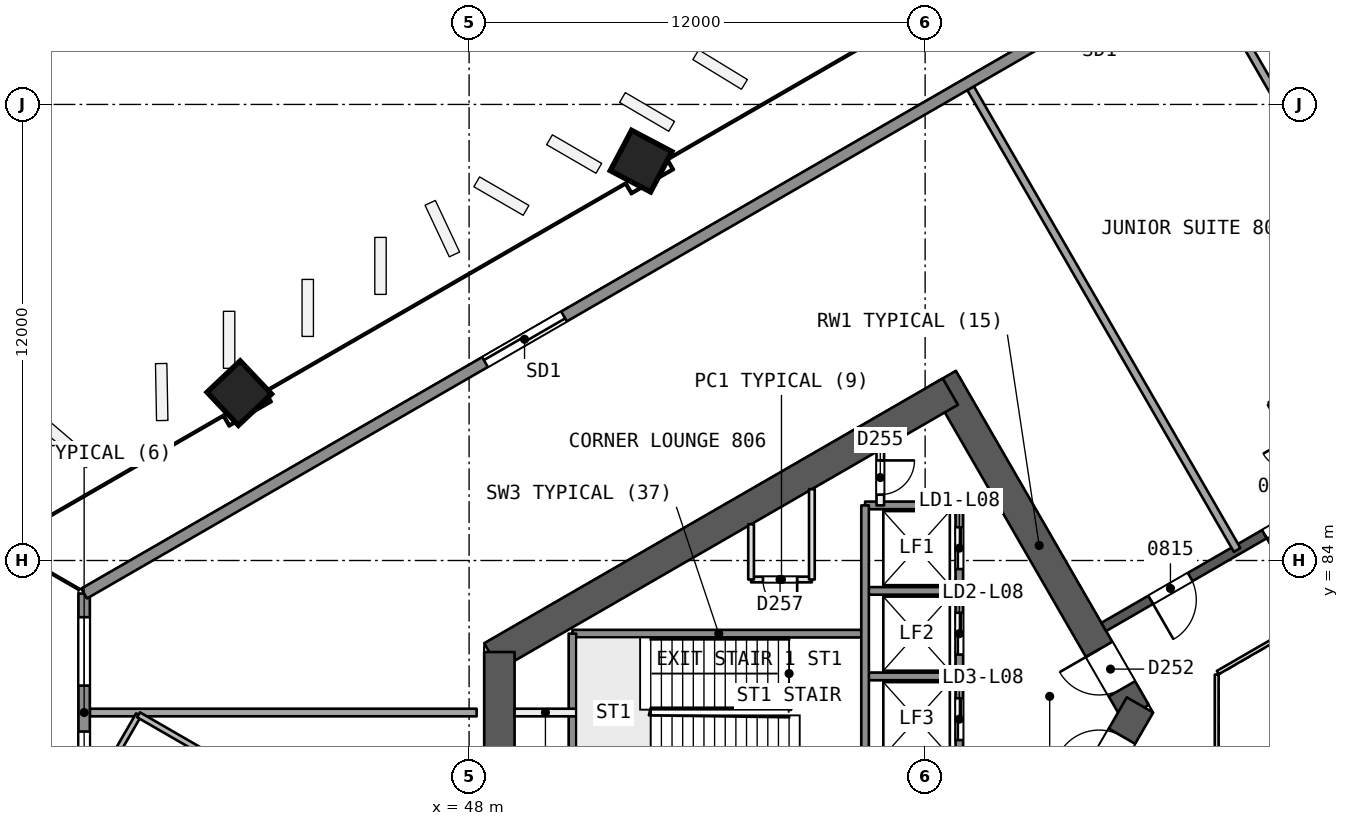
"""IFC4 building model, lengths in metres.
Left out: names, types, materials, properties, quantities, classifications, styles, units other than length and angle.
Written with IfcOpenShell. Run it as: python <this file> out.ifc"""

import sys

from ifc_helpers import new_model, si_unit, direction, frame, frame_2d, origin, origin_2d, place, context, subcontext, project, spatial, rectangle, extrude, element, fill, save


model = new_model("IFC4")
c1 = context("Model", 3, precision=1e-05, world=origin(), true_north=direction((0.0, 1.0)))
c2 = subcontext(c1, "Body", "Model", "MODEL_VIEW")
j1 = project(units=[si_unit("LENGTHUNIT", "METRE"), si_unit("PLANEANGLEUNIT", "RADIAN")], contexts=[c1])
p1 = place(None, origin())
s1 = spatial("IfcSite", under=j1, at=p1, CompositionType="ELEMENT")
p2 = place(p1, origin())
s2 = spatial("IfcBuilding", under=s1, at=p2, CompositionType="ELEMENT")
p3 = place(p2, frame((0.0, 0.0, 41.1)))
s3 = spatial("IfcBuildingStorey", under=s2, at=p3, CompositionType="ELEMENT", Elevation=41.1)
p4 = place(p3, frame((65.538, 80.0, 0.0), z_axis=(0.0, 0.0, 1.0), x_axis=(-0.49999662545, 0.866027352073, 0.0)))
e1 = element("IfcWall", 1, at=p4, inside=s3, PredefinedType="SHEAR", context=c2, shape_type="SweptSolid", body=[
    extrude(rectangle(XDim=10.149, YDim=0.8, at=frame_2d((5.074, 0.0))), origin(), (0.0, 0.0, 1.0), 3.7),
])
p5 = place(p4, frame((0.719, 0.0, 0.0)))
e2 = element("IfcOpeningElement", 2, at=p5, cuts=e1, PredefinedType="OPENING", context=c2, shape_type="SweptSolid", body=[
    extrude(rectangle(XDim=1.2, YDim=2.1, at=frame_2d((0.6, 1.05))), frame((0.0, 0.411, 0.0), z_axis=(0.0, -1.0, 0.0), x_axis=(1.0, 0.0, 0.0)), (0.0, 0.0, 1.0), 0.821),
])
p6 = place(p3, frame((60.664, 88.443, 0.0), z_axis=(0.0, 0.0, 1.0), x_axis=(-0.866029478545, -0.499992942241, 0.0)))
e3 = element("IfcWall", 3, at=p6, inside=s3, PredefinedType="SHEAR", context=c2, shape_type="SweptSolid", body=[
    extrude(rectangle(XDim=13.933, YDim=0.8, at=frame_2d((6.967, 0.0))), origin(), (0.0, 0.0, 1.0), 3.7),
])
p7 = place(p3, frame((48.797, 81.592, 0.0), z_axis=(0.0, 0.0, 1.0), x_axis=(0.0, -1.0, 0.0)))
e4 = element("IfcWall", 4, at=p7, inside=s3, PredefinedType="SHEAR", context=c2, shape_type="SweptSolid", body=[
    extrude(rectangle(XDim=3.415, YDim=0.8, at=frame_2d((1.707, 0.0))), origin(), (0.0, 0.0, 1.0), 3.7),
])
p8 = place(p3, frame((60.664, 71.557, 0.0), z_axis=(0.0, 0.0, 1.0), x_axis=(0.50000409368, 0.866023040284, 0.0)))
e5 = element("IfcWall", 5, at=p8, inside=s3, PredefinedType="SHEAR", context=c2, shape_type="SweptSolid", body=[
    extrude(rectangle(XDim=9.98, YDim=0.8, at=frame_2d((4.99, 0.0))), origin(), (0.0, 0.0, 1.0), 3.7),
])
p9 = place(p8, frame((7.83, 0.0, 0.0)))
e6 = element("IfcOpeningElement", 6, at=p9, cuts=e5, PredefinedType="OPENING", context=c2, shape_type="SweptSolid", body=[
    extrude(rectangle(XDim=1.2, YDim=2.1, at=frame_2d((0.6, 1.05))), frame((0.0, 0.411, 0.0), z_axis=(0.0, -1.0, 0.0), x_axis=(1.0, 0.0, 0.0)), (0.0, 0.0, 1.0), 0.821),
])
p10 = place(p3, frame((78.2, 90.046, 0.0), z_axis=(0.0, 0.0, 1.0), x_axis=(-0.866026492143, -0.499998114903, 0.0)))
e7 = element("IfcWall", 7, at=p10, inside=s3, PredefinedType="SHEAR", context=c2, shape_type="SweptSolid", body=[
    extrude(rectangle(XDim=15.588, YDim=0.25, at=frame_2d((7.794, 0.0))), origin(), (0.0, 0.0, 1.0), 3.2),
])
p11 = place(p10, frame((1.838, 0.0, 0.0)))
e8 = element("IfcOpeningElement", 8, at=p11, cuts=e7, PredefinedType="OPENING", context=c2, shape_type="SweptSolid", body=[
    extrude(rectangle(XDim=1.0, YDim=2.1, at=frame_2d((0.5, 1.05))), frame((0.0, 0.135, 0.0), z_axis=(0.0, -1.0, 0.0), x_axis=(1.0, 0.0, 0.0)), (0.0, 0.0, 1.0), 0.271),
])
p12 = place(p10, frame((9.706, 0.0, 0.0)))
e9 = element("IfcOpeningElement", 9, at=p12, cuts=e7, PredefinedType="OPENING", context=c2, shape_type="SweptSolid", body=[
    extrude(rectangle(XDim=1.0, YDim=2.1, at=frame_2d((0.5, 1.05))), frame((0.0, 0.135, 0.0), z_axis=(0.0, -1.0, 0.0), x_axis=(1.0, 0.0, 0.0)), (0.0, 0.0, 1.0), 0.271),
])
p13 = place(p10, frame((12.962, 0.0, 0.0)))
e10 = element("IfcOpeningElement", 10, at=p13, cuts=e7, PredefinedType="OPENING", context=c2, shape_type="SweptSolid", body=[
    extrude(rectangle(XDim=1.2, YDim=2.4, at=frame_2d((0.6, 1.2))), frame((0.0, 0.135, 0.0), z_axis=(0.0, -1.0, 0.0), x_axis=(1.0, 0.0, 0.0)), (0.0, 0.0, 1.0), 0.271),
])
p14 = place(p3, frame((52.503, 94.523, 0.0), z_axis=(0.019328516974, -0.012138044789, 0.999739504221), x_axis=(-0.500200160538, 0.865674608258, 0.020180981521)))
e11 = element("IfcColumn", 11, at=p14, inside=s3, PredefinedType="COLUMN", context=c2, shape_type="SweptSolid", body=[
    extrude(rectangle(XDim=1.2, YDim=1.2, at=origin_2d()), origin(), (0.0, 0.0, 1.0), 3.701),
])
p15 = place(p3, frame((41.918, 88.412, 0.0), z_axis=(0.02855911485, -0.006793507689, 0.999569019734), x_axis=(-0.500405785832, 0.865555785013, 0.020180003373)))
e12 = element("IfcColumn", 12, at=p15, inside=s3, PredefinedType="COLUMN", context=c2, shape_type="SweptSolid", body=[
    extrude(rectangle(XDim=1.2, YDim=1.2, at=origin_2d()), origin(), (0.0, 0.0, 1.0), 3.702),
])
p16 = place(p3, frame((67.136, 99.855, 0.0), z_axis=(0.0, 0.0, 1.0), x_axis=(0.499997162821, -0.866027041824, 0.0)))
e13 = element("IfcWall", 13, at=p16, inside=s3, PredefinedType="PARTITIONING", context=c2, shape_type="SweptSolid", body=[
    extrude(rectangle(XDim=14.027, YDim=0.2, at=frame_2d((7.013, 0.0))), origin(), (0.0, 0.0, 1.0), 3.2),
])
p17 = place(p3, frame((70.513, 85.608, 0.0), z_axis=(0.0, 0.0, 1.0), x_axis=(-0.499987231761, 0.866032775405, 0.0)))
e14 = element("IfcWall", 14, at=p17, inside=s3, PredefinedType="PARTITIONING", context=c2, shape_type="SweptSolid", body=[
    extrude(rectangle(XDim=2.9, YDim=0.1, at=frame_2d((1.45, 0.0))), origin(), (0.0, 0.0, 1.0), 3.2),
])
p18 = place(p17, frame((1.05, 0.0, 0.0)))
e15 = element("IfcOpeningElement", 15, at=p18, cuts=e14, PredefinedType="OPENING", context=c2, shape_type="SweptSolid", body=[
    extrude(rectangle(XDim=0.8, YDim=2.1, at=frame_2d((0.4, 1.05))), frame((0.0, 0.061, 0.0), z_axis=(0.0, -1.0, 0.0), x_axis=(1.0, 0.0, 0.0)), (0.0, 0.0, 1.0), 0.121),
])
p19 = place(p3, frame((69.063, 88.119, 0.0), z_axis=(0.0, 0.0, 1.0), x_axis=(0.865989903783, 0.500061482766, 0.0)))
e16 = element("IfcWall", 16, at=p19, inside=s3, PredefinedType="PARTITIONING", context=c2, shape_type="SweptSolid", body=[
    extrude(rectangle(XDim=1.6, YDim=0.1, at=frame_2d((0.8, 0.0))), origin(), (0.0, 0.0, 1.0), 3.2),
])
p20 = place(p3, frame((61.197, 96.426, 0.0), z_axis=(0.0, 0.0, 1.0), x_axis=(0.499997162821, -0.866027041824, 0.0)))
e17 = element("IfcWall", 17, at=p20, inside=s3, PredefinedType="PARTITIONING", context=c2, shape_type="SweptSolid", body=[
    extrude(rectangle(XDim=14.027, YDim=0.2, at=frame_2d((7.013, 0.0))), origin(), (0.0, 0.0, 1.0), 3.2),
])
p21 = place(p3, frame((38.019, 80.0, 0.0), z_axis=(0.0, 0.0, 1.0), x_axis=(1.0, 0.0, 0.0)))
e18 = element("IfcWall", 18, at=p21, inside=s3, PredefinedType="PARTITIONING", context=c2, shape_type="SweptSolid", body=[
    extrude(rectangle(XDim=10.179, YDim=0.2, at=frame_2d((5.089, 0.0))), origin(), (0.0, 0.0, 1.0), 3.2),
])
p22 = place(p3, frame((38.019, 77.718, 0.0), z_axis=(0.0, 0.0, 1.0), x_axis=(0.499936653632, 0.866061973738, 0.0)))
e19 = element("IfcWall", 19, at=p22, inside=s3, PredefinedType="PARTITIONING", context=c2, shape_type="SweptSolid", body=[
    extrude(rectangle(XDim=2.565, YDim=0.15, at=frame_2d((1.283, 0.0))), origin(), (0.0, 0.0, 1.0), 3.2),
])
p23 = place(p3, frame((39.302, 79.939, 0.0), z_axis=(0.0, 0.0, 1.0), x_axis=(0.866021400173, -0.500006934395, 0.0)))
e20 = element("IfcWall", 20, at=p23, inside=s3, PredefinedType="PARTITIONING", context=c2, shape_type="SweptSolid", body=[
    extrude(rectangle(XDim=2.6, YDim=0.15, at=frame_2d((1.3, 0.0))), origin(), (0.0, 0.0, 1.0), 3.2),
])
p24 = place(p3, frame((37.87, 76.87, 0.0), z_axis=(0.0, 0.0, 1.0), x_axis=(0.0, 1.0, 0.0)))
e21 = element("IfcWall", 21, at=p24, inside=s3, PredefinedType="SOLIDWALL", context=c2, shape_type="SweptSolid", body=[
    extrude(rectangle(XDim=6.261, YDim=0.3, at=frame_2d((3.13, 0.0))), origin(), (0.0, 0.0, 1.0), 3.2),
])
p25 = place(p24, frame((3.838, 0.0, 0.9)))
e22 = element("IfcOpeningElement", 22, at=p25, cuts=e21, PredefinedType="OPENING", context=c2, shape_type="SweptSolid", body=[
    extrude(rectangle(XDim=1.8, YDim=1.5, at=frame_2d((0.9, 0.75))), frame((0.0, 0.161, 0.0), z_axis=(0.0, -1.0, 0.0), x_axis=(1.0, 0.0, 0.0)), (0.0, 0.0, 1.0), 0.321),
])
p26 = place(p24, frame((0.83, 0.0, 0.9)))
e23 = element("IfcOpeningElement", 23, at=p26, cuts=e21, PredefinedType="OPENING", context=c2, shape_type="SweptSolid", body=[
    extrude(rectangle(XDim=1.8, YDim=1.5, at=frame_2d((0.9, 0.75))), frame((0.0, 0.161, 0.0), z_axis=(0.0, -1.0, 0.0), x_axis=(1.0, 0.0, 0.0)), (0.0, 0.0, 1.0), 0.321),
])
p27 = place(p3, frame((37.87, 83.13, 0.0), z_axis=(0.0, 0.0, 1.0), x_axis=(0.866026630825, 0.499997874697, 0.0)))
e24 = element("IfcWall", 24, at=p27, inside=s3, PredefinedType="SOLIDWALL", context=c2, shape_type="SweptSolid", body=[
    extrude(rectangle(XDim=61.18, YDim=0.3, at=frame_2d((30.59, 0.0))), origin(), (0.0, 0.0, 1.0), 3.2),
])
p28 = place(p27, frame((12.181, 0.0, 0.0)))
e25 = element("IfcOpeningElement", 25, at=p28, cuts=e24, PredefinedType="OPENING", context=c2, shape_type="SweptSolid", body=[
    extrude(rectangle(XDim=2.4, YDim=2.4, at=frame_2d((1.2, 1.2))), frame((0.0, 0.161, 0.0), z_axis=(0.0, -1.0, 0.0), x_axis=(1.0, 0.0, 0.0)), (0.0, 0.0, 1.0), 0.321),
])
p29 = place(p27, frame((34.846, 0.0, 0.0)))
e26 = element("IfcOpeningElement", 26, at=p29, cuts=e24, PredefinedType="OPENING", context=c2, shape_type="SweptSolid", body=[
    extrude(rectangle(XDim=2.4, YDim=2.4, at=frame_2d((1.2, 1.2))), frame((0.0, 0.161, 0.0), z_axis=(0.0, -1.0, 0.0), x_axis=(1.0, 0.0, 0.0)), (0.0, 0.0, 1.0), 0.321),
])
p30 = place(p27, frame((47.439, 0.0, 0.0)))
e27 = element("IfcOpeningElement", 27, at=p30, cuts=e24, PredefinedType="OPENING", context=c2, shape_type="SweptSolid", body=[
    extrude(rectangle(XDim=2.4, YDim=2.4, at=frame_2d((1.2, 1.2))), frame((0.0, 0.161, 0.0), z_axis=(0.0, -1.0, 0.0), x_axis=(1.0, 0.0, 0.0)), (0.0, 0.0, 1.0), 0.321),
])
p31 = place(p27, frame((29.078, 0.0, 0.0)))
e28 = element("IfcOpeningElement", 28, at=p31, cuts=e24, PredefinedType="OPENING", context=c2, shape_type="SweptSolid", body=[
    extrude(rectangle(XDim=2.4, YDim=2.4, at=frame_2d((1.2, 1.2))), frame((0.0, 0.161, 0.0), z_axis=(0.0, -1.0, 0.0), x_axis=(1.0, 0.0, 0.0)), (0.0, 0.0, 1.0), 0.321),
])
p32 = place(p3, frame((60.9, 85.45, 0.0), z_axis=(0.0, 0.0, 1.0), x_axis=(-1.0, 0.0, 0.0)))
e29 = element("IfcWall", 29, at=p32, inside=s3, PredefinedType="SOLIDWALL", context=c2, shape_type="SweptSolid", body=[
    extrude(rectangle(XDim=2.48, YDim=0.2, at=frame_2d((1.24, 0.0))), origin(), (0.0, 0.0, 1.0), 3.2),
])
p33 = place(p3, frame((57.02, 83.5, 0.0), z_axis=(0.0, 0.0, 1.0), x_axis=(-1.0, 0.0, 0.0)))
e30 = element("IfcWall", 30, at=p33, inside=s3, PredefinedType="PARTITIONING", context=c2, shape_type="SweptSolid", body=[
    extrude(rectangle(XDim=1.6, YDim=0.15, at=frame_2d((0.8, 0.0))), origin(), (0.0, 0.0, 1.0), 3.2),
])
p34 = place(p33, frame((0.387, 0.0, 0.0)))
e31 = element("IfcOpeningElement", 31, at=p34, cuts=e30, PredefinedType="OPENING", context=c2, shape_type="SweptSolid", body=[
    extrude(rectangle(XDim=0.9, YDim=2.1, at=frame_2d((0.45, 1.05))), frame((0.0, 0.085, 0.0), z_axis=(0.0, -1.0, 0.0), x_axis=(1.0, 0.0, 0.0)), (0.0, 0.0, 1.0), 0.171),
])
p35 = place(p3, frame((60.9, 83.2, 0.0), z_axis=(0.0, 0.0, 1.0), x_axis=(-1.0, 0.0, 0.0)))
e32 = element("IfcWall", 32, at=p35, inside=s3, PredefinedType="SOLIDWALL", context=c2, shape_type="SweptSolid", body=[
    extrude(rectangle(XDim=2.48, YDim=0.2, at=frame_2d((1.24, 0.0))), origin(), (0.0, 0.0, 1.0), 3.2),
])
p36 = place(p3, frame((58.42, 82.075, 0.0), z_axis=(0.0, 0.0, 1.0), x_axis=(-1.0, 0.0, 0.0)))
e33 = element("IfcWall", 33, at=p36, inside=s3, PredefinedType="SOLIDWALL", context=c2, shape_type="SweptSolid", body=[
    extrude(rectangle(XDim=7.7, YDim=0.2, at=frame_2d((3.85, 0.0))), origin(), (0.0, 0.0, 1.0), 3.2),
])
p37 = place(p3, frame((60.9, 80.95, 0.0), z_axis=(0.0, 0.0, 1.0), x_axis=(-1.0, 0.0, 0.0)))
e34 = element("IfcWall", 34, at=p37, inside=s3, PredefinedType="SOLIDWALL", context=c2, shape_type="SweptSolid", body=[
    extrude(rectangle(XDim=2.48, YDim=0.2, at=frame_2d((1.24, 0.0))), origin(), (0.0, 0.0, 1.0), 3.2),
])
p38 = place(p3, frame((50.82, 80.0, 0.0), z_axis=(0.0, 0.0, 1.0), x_axis=(-1.0, 0.0, 0.0)))
e35 = element("IfcWall", 35, at=p38, inside=s3, PredefinedType="PARTITIONING", context=c2, shape_type="SweptSolid", body=[
    extrude(rectangle(XDim=1.623, YDim=0.2, at=frame_2d((0.812, 0.0))), origin(), (0.0, 0.0, 1.0), 3.2),
])
p39 = place(p3, frame((60.9, 85.45, 0.0), z_axis=(0.0, 0.0, 1.0), x_axis=(0.0, -1.0, 0.0)))
e36 = element("IfcWall", 36, at=p39, inside=s3, PredefinedType="SOLIDWALL", context=c2, shape_type="SweptSolid", body=[
    extrude(rectangle(XDim=10.9, YDim=0.2, at=frame_2d((5.45, 0.0))), origin(), (0.0, 0.0, 1.0), 3.2),
])
p40 = place(p39, frame((0.575, 0.0, 0.0)))
e37 = element("IfcOpeningElement", 37, at=p40, cuts=e36, PredefinedType="OPENING", context=c2, shape_type="SweptSolid", body=[
    extrude(rectangle(XDim=1.1, YDim=2.1, at=frame_2d((0.55, 1.05))), frame((0.0, 0.11, 0.0), z_axis=(0.0, -1.0, 0.0), x_axis=(1.0, 0.0, 0.0)), (0.0, 0.0, 1.0), 0.221),
])
p41 = place(p39, frame((2.825, 0.0, 0.0)))
e38 = element("IfcOpeningElement", 38, at=p41, cuts=e36, PredefinedType="OPENING", context=c2, shape_type="SweptSolid", body=[
    extrude(rectangle(XDim=1.1, YDim=2.1, at=frame_2d((0.55, 1.05))), frame((0.0, 0.11, 0.0), z_axis=(0.0, -1.0, 0.0), x_axis=(1.0, 0.0, 0.0)), (0.0, 0.0, 1.0), 0.221),
])
p42 = place(p39, frame((5.075, 0.0, 0.0)))
e39 = element("IfcOpeningElement", 39, at=p42, cuts=e36, PredefinedType="OPENING", context=c2, shape_type="SweptSolid", body=[
    extrude(rectangle(XDim=1.1, YDim=2.1, at=frame_2d((0.55, 1.05))), frame((0.0, 0.11, 0.0), z_axis=(0.0, -1.0, 0.0), x_axis=(1.0, 0.0, 0.0)), (0.0, 0.0, 1.0), 0.221),
])
p43 = place(p39, frame((7.325, 0.0, 0.0)))
e40 = element("IfcOpeningElement", 40, at=p43, cuts=e36, PredefinedType="OPENING", context=c2, shape_type="SweptSolid", body=[
    extrude(rectangle(XDim=1.1, YDim=2.1, at=frame_2d((0.55, 1.05))), frame((0.0, 0.11, 0.0), z_axis=(0.0, -1.0, 0.0), x_axis=(1.0, 0.0, 0.0)), (0.0, 0.0, 1.0), 0.221),
])
p44 = place(p3, frame((58.82, 86.917, 0.0), z_axis=(0.0, 0.0, 1.0), x_axis=(0.0, -1.0, 0.0)))
e41 = element("IfcWall", 41, at=p44, inside=s3, PredefinedType="PARTITIONING", context=c2, shape_type="SweptSolid", body=[
    extrude(rectangle(XDim=1.467, YDim=0.2, at=frame_2d((0.733, 0.0))), origin(), (0.0, 0.0, 1.0), 3.2),
])
p45 = place(p44, frame((0.283, 0.0, 0.0)))
e42 = element("IfcOpeningElement", 42, at=p45, cuts=e41, PredefinedType="OPENING", context=c2, shape_type="SweptSolid", body=[
    extrude(rectangle(XDim=0.9, YDim=2.1, at=frame_2d((0.45, 1.05))), frame((0.0, 0.11, 0.0), z_axis=(0.0, -1.0, 0.0), x_axis=(1.0, 0.0, 0.0)), (0.0, 0.0, 1.0), 0.221),
])
p46 = place(p3, frame((58.42, 85.45, 0.0), z_axis=(0.0, 0.0, 1.0), x_axis=(0.0, -1.0, 0.0)))
e43 = element("IfcWall", 43, at=p46, inside=s3, PredefinedType="SOLIDWALL", context=c2, shape_type="SweptSolid", body=[
    extrude(rectangle(XDim=9.0, YDim=0.2, at=frame_2d((4.5, 0.0))), origin(), (0.0, 0.0, 1.0), 3.2),
])
p47 = place(p3, frame((57.02, 85.877, 0.0), z_axis=(0.0, 0.0, 1.0), x_axis=(0.0, -1.0, 0.0)))
e44 = element("IfcWall", 44, at=p47, inside=s3, PredefinedType="PARTITIONING", context=c2, shape_type="SweptSolid", body=[
    extrude(rectangle(XDim=2.377, YDim=0.15, at=frame_2d((1.189, 0.0))), origin(), (0.0, 0.0, 1.0), 3.2),
])
p48 = place(p3, frame((55.42, 84.954, 0.0), z_axis=(0.0, 0.0, 1.0), x_axis=(0.0, -1.0, 0.0)))
e45 = element("IfcWall", 45, at=p48, inside=s3, PredefinedType="PARTITIONING", context=c2, shape_type="SweptSolid", body=[
    extrude(rectangle(XDim=1.454, YDim=0.15, at=frame_2d((0.727, 0.0))), origin(), (0.0, 0.0, 1.0), 3.2),
])
p49 = place(p3, frame((50.72, 82.075, 0.0), z_axis=(0.0, 0.0, 1.0), x_axis=(0.0, -1.0, 0.0)))
e46 = element("IfcWall", 46, at=p49, inside=s3, PredefinedType="SOLIDWALL", context=c2, shape_type="SweptSolid", body=[
    extrude(rectangle(XDim=4.15, YDim=0.2, at=frame_2d((2.075, 0.0))), origin(), (0.0, 0.0, 1.0), 3.2),
])
p50 = place(p3, frame((77.738, 86.846, 0.0), z_axis=(0.0, 0.0, 1.0), x_axis=(-0.866026658274, -0.499997827154, 0.0)))
e47 = element("IfcWall", 47, at=p50, inside=s3, PredefinedType="PARTITIONING", context=c2, shape_type="SweptSolid", body=[
    extrude(rectangle(XDim=11.588, YDim=0.1, at=frame_2d((5.794, 0.0))), origin(), (0.0, 0.0, 1.0), 3.2),
])
p51 = place(p3, frame((67.672, 81.0, 0.0), z_axis=(0.0, 0.0, 1.0), x_axis=(0.0, -1.0, 0.0)))
e48 = element("IfcWall", 48, at=p51, inside=s3, PredefinedType="PARTITIONING", context=c2, shape_type="SweptSolid", body=[
    extrude(rectangle(XDim=2.0, YDim=0.1, at=frame_2d((1.0, 0.0))), origin(), (0.0, 0.0, 1.0), 3.2),
])
p52 = place(p12, origin())
e49 = element("IfcDoor", 49, at=p52, inside=s3, OperationType="SINGLE_SWING_RIGHT", PredefinedType="NOTDEFINED", context=c2, shape_type="SweptSolid", body=[
    extrude(rectangle(XDim=1.0, YDim=2.1, at=frame_2d((0.5, 1.05))), frame((0.0, 0.025, 0.0), z_axis=(0.0, -1.0, 0.0), x_axis=(1.0, 0.0, 0.0)), (0.0, 0.0, 1.0), 0.05),
])
fill(e9, e49)
p53 = place(p13, origin())
e50 = element("IfcDoor", 50, at=p53, inside=s3, OperationType="SINGLE_SWING_RIGHT", PredefinedType="NOTDEFINED", context=c2, shape_type="SweptSolid", body=[
    extrude(rectangle(XDim=1.2, YDim=2.4, at=frame_2d((0.6, 1.2))), frame((0.0, 0.025, 0.0), z_axis=(0.0, -1.0, 0.0), x_axis=(1.0, 0.0, 0.0)), (0.0, 0.0, 1.0), 0.05),
])
fill(e10, e50)
p54 = place(p25, origin())
e51 = element("IfcWindow", 51, at=p54, inside=s3, PartitioningType="SINGLE_PANEL", PredefinedType="WINDOW", context=c2, shape_type="SweptSolid", body=[
    extrude(rectangle(XDim=1.8, YDim=1.5, at=frame_2d((0.9, 0.75))), frame((0.0, 0.03, 0.0), z_axis=(0.0, -1.0, 0.0), x_axis=(1.0, 0.0, 0.0)), (0.0, 0.0, 1.0), 0.06),
])
fill(e22, e51)
p55 = place(p26, origin())
e52 = element("IfcWindow", 52, at=p55, inside=s3, PartitioningType="SINGLE_PANEL", PredefinedType="WINDOW", context=c2, shape_type="SweptSolid", body=[
    extrude(rectangle(XDim=1.8, YDim=1.5, at=frame_2d((0.9, 0.75))), frame((0.0, 0.03, 0.0), z_axis=(0.0, -1.0, 0.0), x_axis=(1.0, 0.0, 0.0)), (0.0, 0.0, 1.0), 0.06),
])
fill(e23, e52)
p56 = place(p28, origin())
e53 = element("IfcDoor", 53, at=p56, inside=s3, OperationType="SLIDING_TO_LEFT", PredefinedType="NOTDEFINED", context=c2, shape_type="SweptSolid", body=[
    extrude(rectangle(XDim=2.4, YDim=2.4, at=frame_2d((1.2, 1.2))), frame((0.0, 0.025, 0.0), z_axis=(0.0, -1.0, 0.0), x_axis=(1.0, 0.0, 0.0)), (0.0, 0.0, 1.0), 0.05),
])
fill(e25, e53)
p57 = place(p5, origin())
e54 = element("IfcDoor", 54, at=p57, inside=s3, OperationType="SINGLE_SWING_RIGHT", PredefinedType="NOTDEFINED", context=c2, shape_type="SweptSolid", body=[
    extrude(rectangle(XDim=1.2, YDim=2.1, at=frame_2d((0.6, 1.05))), frame((0.0, 0.025, 0.0), z_axis=(0.0, -1.0, 0.0), x_axis=(1.0, 0.0, 0.0)), (0.0, 0.0, 1.0), 0.05),
])
fill(e2, e54)
p58 = place(p9, origin())
e55 = element("IfcDoor", 55, at=p58, inside=s3, OperationType="SINGLE_SWING_LEFT", PredefinedType="NOTDEFINED", context=c2, shape_type="SweptSolid", body=[
    extrude(rectangle(XDim=1.2, YDim=2.1, at=frame_2d((0.6, 1.05))), frame((0.0, 0.025, 0.0), z_axis=(0.0, -1.0, 0.0), x_axis=(1.0, 0.0, 0.0)), (0.0, 0.0, 1.0), 0.05),
])
fill(e6, e55)
p59 = place(p40, origin())
e56 = element("IfcDoor", 56, at=p59, inside=s3, OperationType="SLIDING_TO_RIGHT", PredefinedType="NOTDEFINED", context=c2, shape_type="SweptSolid", body=[
    extrude(rectangle(XDim=1.1, YDim=2.1, at=frame_2d((0.55, 1.05))), frame((0.0, 0.025, 0.0), z_axis=(0.0, -1.0, 0.0), x_axis=(1.0, 0.0, 0.0)), (0.0, 0.0, 1.0), 0.05),
])
fill(e37, e56)
p60 = place(p41, origin())
e57 = element("IfcDoor", 57, at=p60, inside=s3, OperationType="SLIDING_TO_LEFT", PredefinedType="NOTDEFINED", context=c2, shape_type="SweptSolid", body=[
    extrude(rectangle(XDim=1.1, YDim=2.1, at=frame_2d((0.55, 1.05))), frame((0.0, 0.025, 0.0), z_axis=(0.0, -1.0, 0.0), x_axis=(1.0, 0.0, 0.0)), (0.0, 0.0, 1.0), 0.05),
])
fill(e38, e57)
p61 = place(p42, origin())
e58 = element("IfcDoor", 58, at=p61, inside=s3, OperationType="SLIDING_TO_RIGHT", PredefinedType="NOTDEFINED", context=c2, shape_type="SweptSolid", body=[
    extrude(rectangle(XDim=1.1, YDim=2.1, at=frame_2d((0.55, 1.05))), frame((0.0, 0.025, 0.0), z_axis=(0.0, -1.0, 0.0), x_axis=(1.0, 0.0, 0.0)), (0.0, 0.0, 1.0), 0.05),
])
fill(e39, e58)
p62 = place(p45, origin())
e59 = element("IfcDoor", 59, at=p62, inside=s3, OperationType="SINGLE_SWING_LEFT", PredefinedType="NOTDEFINED", context=c2, shape_type="SweptSolid", body=[
    extrude(rectangle(XDim=0.9, YDim=2.1, at=frame_2d((0.45, 1.05))), frame((0.0, 0.025, 0.0), z_axis=(0.0, -1.0, 0.0), x_axis=(1.0, 0.0, 0.0)), (0.0, 0.0, 1.0), 0.05),
])
fill(e42, e59)
p63 = place(p34, origin())
e60 = element("IfcDoor", 60, at=p63, inside=s3, OperationType="SINGLE_SWING_LEFT", PredefinedType="NOTDEFINED", context=c2, shape_type="SweptSolid", body=[
    extrude(rectangle(XDim=0.9, YDim=2.1, at=frame_2d((0.45, 1.05))), frame((0.0, 0.025, 0.0), z_axis=(0.0, -1.0, 0.0), x_axis=(1.0, 0.0, 0.0)), (0.0, 0.0, 1.0), 0.05),
])
fill(e31, e60)
save(model, sys.argv[1])
